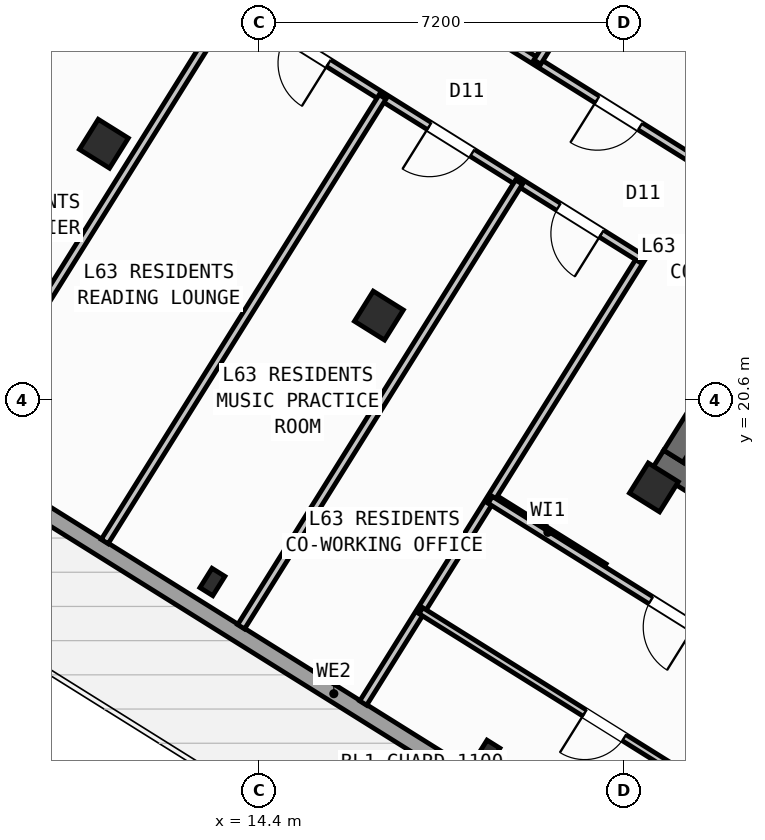
"""IFC4 building model, lengths in metres.
Left out: names, types, materials, properties, quantities, classifications, styles, units other than length and angle.
Written with IfcOpenShell. Run it as: python <this file> out.ifc"""

import sys

from ifc_helpers import new_model, si_unit, direction, frame, frame_2d, origin, origin_2d, place, context, subcontext, project, spatial, rectangle, hollow_rectangle, i_section, extrude, source, transform, mapped, element, fill, save


model = new_model("IFC4")
c1 = context("Model", 3, precision=1e-05, world=origin(), true_north=direction((0.0, 1.0)))
c2 = subcontext(c1, "Body", "Model", "MODEL_VIEW")
j1 = project(units=[si_unit("LENGTHUNIT", "METRE"), si_unit("PLANEANGLEUNIT", "RADIAN")], contexts=[c1])
p1 = place(None, origin())
s1 = spatial("IfcSite", under=j1, at=p1, CompositionType="ELEMENT")
p2 = place(p1, origin())
s2 = spatial("IfcBuilding", under=s1, at=p2, CompositionType="ELEMENT")
p3 = place(p2, frame((0.0, 0.0, 251.1)))
s3 = spatial("IfcBuildingStorey", under=s2, at=p3, CompositionType="ELEMENT", Elevation=251.1)
p4 = place(p3, frame((33.324, 12.503, 0.0), z_axis=(0.0, 0.0, 1.0), x_axis=(-0.848043529849, 0.529926571782, 0.0)))
e1 = element("IfcWall", 1, at=p4, inside=s3, PredefinedType="SHEAR", context=c2, shape_type="SweptSolid", body=[
    extrude(rectangle(XDim=13.04, YDim=0.45, at=frame_2d((6.52, 0.0))), origin(), (0.0, 0.0, 1.0), 3.32),
])
p5 = place(p3, frame((26.007, 24.976, 0.0), z_axis=(0.0, 0.0, 1.0), x_axis=(-0.529931155655, -0.848040665456, 0.0)))
e2 = element("IfcWall", 2, at=p5, inside=s3, PredefinedType="SHEAR", context=c2, shape_type="SweptSolid", body=[
    extrude(rectangle(XDim=6.475, YDim=0.45, at=frame_2d((3.238, 0.0))), origin(), (0.0, 0.0, 1.0), 3.32),
])
m1 = source(origin(), c2, "Body", "SweptSolid", [
    extrude(hollow_rectangle(XDim=0.7, YDim=0.7, WallThickness=0.028, at=origin_2d()), origin(), (0.0, 0.0, 1.0), 3.6),
])
p6 = place(p3, frame((22.191, 18.87, 0.0), z_axis=(0.0, 0.0, 1.0), x_axis=(-0.848048096156, 0.529919264233, 0.0)))
e3 = element("IfcColumn", 3, at=p6, inside=s3, PredefinedType="COLUMN", context=c2, shape_type="MappedRepresentation", body=[
    mapped(m1, transform((0.0, 0.0, 0.0), scale=1.0)),
])
m2 = source(origin(), c2, "Body", "SweptSolid", [
    extrude(i_section(OverallWidth=0.3, OverallDepth=0.45, WebThickness=0.014, FlangeThickness=0.026, at=origin_2d()), origin(), (0.0, 0.0, 1.0), 3.6),
])
p7 = place(p3, frame((18.906, 13.612, 0.0), z_axis=(0.0, 0.0, 1.0), x_axis=(-0.848048096156, 0.529919264233, 0.0)))
e4 = element("IfcColumn", 4, at=p7, inside=s3, PredefinedType="COLUMN", context=c2, shape_type="MappedRepresentation", body=[
    mapped(m2, transform((0.0, 0.0, 0.0), scale=1.0)),
])
p8 = place(p3, frame((16.764, 22.261, 0.0), z_axis=(0.0, 0.0, 1.0), x_axis=(-0.848048096156, 0.529919264233, 0.0)))
e5 = element("IfcColumn", 5, at=p8, inside=s3, PredefinedType="COLUMN", context=c2, shape_type="MappedRepresentation", body=[
    mapped(m1, transform((0.0, 0.0, 0.0), scale=1.0)),
])
p9 = place(p3, frame((13.478, 17.003, 0.0), z_axis=(0.0, 0.0, 1.0), x_axis=(-0.848048096156, 0.529919264233, 0.0)))
e6 = element("IfcColumn", 6, at=p9, inside=s3, PredefinedType="COLUMN", context=c2, shape_type="MappedRepresentation", body=[
    mapped(m2, transform((0.0, 0.0, 0.0), scale=1.0)),
])
p10 = place(p3, frame((11.336, 25.653, 0.0), z_axis=(0.0, 0.0, 1.0), x_axis=(-0.848048096156, 0.529919264233, 0.0)))
e7 = element("IfcColumn", 7, at=p10, inside=s3, PredefinedType="COLUMN", context=c2, shape_type="MappedRepresentation", body=[
    mapped(m1, transform((0.0, 0.0, 0.0), scale=1.0)),
])
p11 = place(p3, frame((29.268, 6.429, 0.0), z_axis=(0.0, 0.0, 1.0), x_axis=(-0.848049971435, 0.529916263149, 0.0)))
e8 = element("IfcWall", 8, at=p11, inside=s3, PredefinedType="STANDARD", context=c2, shape_type="SweptSolid", body=[
    extrude(rectangle(XDim=31.588, YDim=0.32, at=frame_2d((15.794, 0.0))), origin(), (0.0, 0.0, 1.0), 3.32),
])
p12 = place(p11, frame((22.848, 0.0, 0.0)))
e9 = element("IfcOpeningElement", 9, at=p12, cuts=e8, PredefinedType="OPENING", context=c2, shape_type="SweptSolid", body=[
    extrude(rectangle(XDim=1.2, YDim=2.15, at=frame_2d((0.6, 1.075))), frame((0.0, 0.17, 0.0), z_axis=(0.0, -1.0, 0.0), x_axis=(1.0, 0.0, 0.0)), (0.0, 0.0, 1.0), 0.34),
])
p13 = place(p11, frame((3.178, 0.0, 0.9)))
e10 = element("IfcOpeningElement", 10, at=p13, cuts=e8, PredefinedType="OPENING", context=c2, shape_type="SweptSolid", body=[
    extrude(rectangle(XDim=1.65, YDim=1.45, at=frame_2d((0.825, 0.725))), frame((0.0, 0.17, 0.0), z_axis=(0.0, -1.0, 0.0), x_axis=(1.0, 0.0, 0.0)), (0.0, 0.0, 1.0), 0.34),
])
p14 = place(p11, frame((8.478, 0.0, 0.9)))
e11 = element("IfcOpeningElement", 11, at=p14, cuts=e8, PredefinedType="OPENING", context=c2, shape_type="SweptSolid", body=[
    extrude(rectangle(XDim=1.65, YDim=1.45, at=frame_2d((0.825, 0.725))), frame((0.0, 0.17, 0.0), z_axis=(0.0, -1.0, 0.0), x_axis=(1.0, 0.0, 0.0)), (0.0, 0.0, 1.0), 0.34),
])
p15 = place(p3, frame((2.415, 23.452, 0.0), z_axis=(0.0, 0.0, 1.0), x_axis=(0.52991049553, 0.848053575387, 0.0)))
e12 = element("IfcWall", 12, at=p15, inside=s3, PredefinedType="STANDARD", context=c2, shape_type="SweptSolid", body=[
    extrude(rectangle(XDim=21.587, YDim=0.32, at=frame_2d((10.794, 0.0))), origin(), (0.0, 0.0, 1.0), 2.845),
])
p16 = place(p15, frame((3.119, 0.0, 0.9)))
e13 = element("IfcOpeningElement", 13, at=p16, cuts=e12, PredefinedType="OPENING", context=c2, shape_type="SweptSolid", body=[
    extrude(rectangle(XDim=1.65, YDim=1.45, at=frame_2d((0.825, 0.725))), frame((0.0, 0.17, 0.0), z_axis=(0.0, -1.0, 0.0), x_axis=(1.0, 0.0, 0.0)), (0.0, 0.0, 1.0), 0.34),
])
p17 = place(p15, frame((7.854, 0.0, 0.9)))
e14 = element("IfcOpeningElement", 14, at=p17, cuts=e12, PredefinedType="OPENING", context=c2, shape_type="SweptSolid", body=[
    extrude(rectangle(XDim=1.35, YDim=1.45, at=frame_2d((0.675, 0.725))), frame((0.0, 0.17, 0.0), z_axis=(0.0, -1.0, 0.0), x_axis=(1.0, 0.0, 0.0)), (0.0, 0.0, 1.0), 0.34),
])
p18 = place(p15, frame((16.979, 0.0, 0.95)))
e15 = element("IfcOpeningElement", 15, at=p18, cuts=e12, PredefinedType="OPENING", context=c2, shape_type="SweptSolid", body=[
    extrude(rectangle(XDim=1.95, YDim=1.35, at=frame_2d((0.975, 0.675))), frame((0.0, 0.17, 0.0), z_axis=(0.0, -1.0, 0.0), x_axis=(1.0, 0.0, 0.0)), (0.0, 0.0, 1.0), 0.34),
])
p19 = place(p3, frame((14.138, 41.825, 0.0), z_axis=(0.0, 0.0, 1.0), x_axis=(0.848046498049, -0.529921821731, 0.0)))
e16 = element("IfcWall", 16, at=p19, inside=s3, PredefinedType="STANDARD", context=c2, shape_type="SweptSolid", body=[
    extrude(rectangle(XDim=31.588, YDim=0.32, at=frame_2d((15.794, 0.0))), origin(), (0.0, 0.0, 1.0), 3.32),
])
p20 = place(p19, frame((3.46, 0.0, 0.0)))
e17 = element("IfcOpeningElement", 17, at=p20, cuts=e16, PredefinedType="OPENING", context=c2, shape_type="SweptSolid", body=[
    extrude(rectangle(XDim=1.05, YDim=2.15, at=frame_2d((0.525, 1.075))), frame((0.0, 0.17, 0.0), z_axis=(0.0, -1.0, 0.0), x_axis=(1.0, 0.0, 0.0)), (0.0, 0.0, 1.0), 0.34),
])
p21 = place(p19, frame((0.831, 0.0, 1.0)))
e18 = element("IfcOpeningElement", 18, at=p21, cuts=e16, PredefinedType="OPENING", context=c2, shape_type="SweptSolid", body=[
    extrude(rectangle(XDim=0.9, YDim=1.25, at=frame_2d((0.45, 0.625))), frame((0.0, 0.17, 0.0), z_axis=(0.0, -1.0, 0.0), x_axis=(1.0, 0.0, 0.0)), (0.0, 0.0, 1.0), 0.34),
])
p22 = place(p19, frame((9.837, 0.0, 0.9)))
e19 = element("IfcOpeningElement", 19, at=p22, cuts=e16, PredefinedType="OPENING", context=c2, shape_type="SweptSolid", body=[
    extrude(rectangle(XDim=1.35, YDim=1.45, at=frame_2d((0.675, 0.725))), frame((0.0, 0.17, 0.0), z_axis=(0.0, -1.0, 0.0), x_axis=(1.0, 0.0, 0.0)), (0.0, 0.0, 1.0), 0.34),
])
p23 = place(p19, frame((13.599, 0.0, 0.95)))
e20 = element("IfcOpeningElement", 20, at=p23, cuts=e16, PredefinedType="OPENING", context=c2, shape_type="SweptSolid", body=[
    extrude(rectangle(XDim=1.95, YDim=1.35, at=frame_2d((0.975, 0.675))), frame((0.0, 0.17, 0.0), z_axis=(0.0, -1.0, 0.0), x_axis=(1.0, 0.0, 0.0)), (0.0, 0.0, 1.0), 0.34),
])
p24 = place(p19, frame((17.154, 0.0, 1.0)))
e21 = element("IfcOpeningElement", 21, at=p24, cuts=e16, PredefinedType="OPENING", context=c2, shape_type="SweptSolid", body=[
    extrude(rectangle(XDim=0.9, YDim=1.25, at=frame_2d((0.45, 0.625))), frame((0.0, 0.17, 0.0), z_axis=(0.0, -1.0, 0.0), x_axis=(1.0, 0.0, 0.0)), (0.0, 0.0, 1.0), 0.34),
])
p25 = place(p19, frame((21.651, 0.0, 0.9)))
e22 = element("IfcOpeningElement", 22, at=p25, cuts=e16, PredefinedType="OPENING", context=c2, shape_type="SweptSolid", body=[
    extrude(rectangle(XDim=1.65, YDim=1.45, at=frame_2d((0.825, 0.725))), frame((0.0, 0.17, 0.0), z_axis=(0.0, -1.0, 0.0), x_axis=(1.0, 0.0, 0.0)), (0.0, 0.0, 1.0), 0.34),
])
p26 = place(p19, frame((27.215, 0.0, 0.9)))
e23 = element("IfcOpeningElement", 23, at=p26, cuts=e16, PredefinedType="OPENING", context=c2, shape_type="SweptSolid", body=[
    extrude(rectangle(XDim=1.65, YDim=1.45, at=frame_2d((0.825, 0.725))), frame((0.0, 0.17, 0.0), z_axis=(0.0, -1.0, 0.0), x_axis=(1.0, 0.0, 0.0)), (0.0, 0.0, 1.0), 0.34),
])
p27 = place(p3, frame((21.206, 17.292, 0.0), z_axis=(0.0, 0.0, 1.0), x_axis=(-0.848050851465, 0.529914854792, 0.0)))
e24 = element("IfcWall", 24, at=p27, inside=s3, PredefinedType="PARTITIONING", context=c2, shape_type="SweptSolid", body=[
    extrude(rectangle(XDim=2.61, YDim=0.16, at=frame_2d((1.305, 0.0))), origin(), (0.0, 0.0, 1.0), 3.31),
])
p28 = place(p3, frame((21.938, 23.391, 0.0), z_axis=(0.0, 0.0, 1.0), x_axis=(-0.529924725692, -0.848044683434, 0.0)))
e25 = element("IfcWall", 25, at=p28, inside=s3, PredefinedType="PARTITIONING", context=c2, shape_type="SweptSolid", body=[
    extrude(rectangle(XDim=10.35, YDim=0.16, at=frame_2d((5.175, 0.0))), origin(), (0.0, 0.0, 1.0), 3.31),
])
p29 = place(p3, frame((23.104, 25.256, 0.0), z_axis=(0.0, 0.0, 1.0), x_axis=(-0.848041752158, 0.529929416617, 0.0)))
e26 = element("IfcWall", 26, at=p29, inside=s3, PredefinedType="PARTITIONING", context=c2, shape_type="SweptSolid", body=[
    extrude(rectangle(XDim=16.73, YDim=0.16, at=frame_2d((8.365, 0.0))), origin(), (0.0, 0.0, 1.0), 3.31),
])
p30 = place(p29, frame((1.395, 0.0, 0.0)))
e27 = element("IfcOpeningElement", 27, at=p30, cuts=e26, PredefinedType="OPENING", context=c2, shape_type="SweptSolid", body=[
    extrude(rectangle(XDim=1.0, YDim=2.1, at=frame_2d((0.5, 1.05))), frame((0.0, 0.09, 0.0), z_axis=(0.0, -1.0, 0.0), x_axis=(1.0, 0.0, 0.0)), (0.0, 0.0, 1.0), 0.18),
])
p31 = place(p29, frame((7.82, 0.0, 0.0)))
e28 = element("IfcOpeningElement", 28, at=p31, cuts=e26, PredefinedType="OPENING", context=c2, shape_type="SweptSolid", body=[
    extrude(rectangle(XDim=1.0, YDim=2.1, at=frame_2d((0.5, 1.05))), frame((0.0, 0.09, 0.0), z_axis=(0.0, -1.0, 0.0), x_axis=(1.0, 0.0, 0.0)), (0.0, 0.0, 1.0), 0.18),
])
p32 = place(p29, frame((14.76, 0.0, 0.0)))
e29 = element("IfcOpeningElement", 29, at=p32, cuts=e26, PredefinedType="OPENING", context=c2, shape_type="SweptSolid", body=[
    extrude(rectangle(XDim=1.0, YDim=2.1, at=frame_2d((0.5, 1.05))), frame((0.0, 0.09, 0.0), z_axis=(0.0, -1.0, 0.0), x_axis=(1.0, 0.0, 0.0)), (0.0, 0.0, 1.0), 0.18),
])
p33 = place(p3, frame((21.938, 23.391, 0.0), z_axis=(0.0, 0.0, 1.0), x_axis=(-0.848045850158, 0.529922858565, 0.0)))
e30 = element("IfcWall", 30, at=p33, inside=s3, PredefinedType="PARTITIONING", context=c2, shape_type="SweptSolid", body=[
    extrude(rectangle(XDim=16.73, YDim=0.16, at=frame_2d((8.365, 0.0))), origin(), (0.0, 0.0, 1.0), 3.31),
])
p34 = place(p33, frame((0.92, 0.0, 0.0)))
e31 = element("IfcOpeningElement", 31, at=p34, cuts=e30, PredefinedType="OPENING", context=c2, shape_type="SweptSolid", body=[
    extrude(rectangle(XDim=1.0, YDim=2.1, at=frame_2d((0.5, 1.05))), frame((0.0, 0.09, 0.0), z_axis=(0.0, -1.0, 0.0), x_axis=(1.0, 0.0, 0.0)), (0.0, 0.0, 1.0), 0.18),
])
p35 = place(p33, frame((3.928, 0.0, 0.0)))
e32 = element("IfcOpeningElement", 32, at=p35, cuts=e30, PredefinedType="OPENING", context=c2, shape_type="SweptSolid", body=[
    extrude(rectangle(XDim=1.0, YDim=2.1, at=frame_2d((0.5, 1.05))), frame((0.0, 0.09, 0.0), z_axis=(0.0, -1.0, 0.0), x_axis=(1.0, 0.0, 0.0)), (0.0, 0.0, 1.0), 0.18),
])
p36 = place(p33, frame((7.271, 0.0, 0.0)))
e33 = element("IfcOpeningElement", 33, at=p36, cuts=e30, PredefinedType="OPENING", context=c2, shape_type="SweptSolid", body=[
    extrude(rectangle(XDim=1.0, YDim=2.1, at=frame_2d((0.5, 1.05))), frame((0.0, 0.09, 0.0), z_axis=(0.0, -1.0, 0.0), x_axis=(1.0, 0.0, 0.0)), (0.0, 0.0, 1.0), 0.18),
])
p37 = place(p33, frame((10.78, 0.0, 0.0)))
e34 = element("IfcOpeningElement", 34, at=p37, cuts=e30, PredefinedType="OPENING", context=c2, shape_type="SweptSolid", body=[
    extrude(rectangle(XDim=1.0, YDim=2.1, at=frame_2d((0.5, 1.05))), frame((0.0, 0.09, 0.0), z_axis=(0.0, -1.0, 0.0), x_axis=(1.0, 0.0, 0.0)), (0.0, 0.0, 1.0), 0.18),
])
p38 = place(p33, frame((14.372, 0.0, 0.0)))
e35 = element("IfcOpeningElement", 35, at=p38, cuts=e30, PredefinedType="OPENING", context=c2, shape_type="SweptSolid", body=[
    extrude(rectangle(XDim=1.0, YDim=2.1, at=frame_2d((0.5, 1.05))), frame((0.0, 0.09, 0.0), z_axis=(0.0, -1.0, 0.0), x_axis=(1.0, 0.0, 0.0)), (0.0, 0.0, 1.0), 0.18),
])
p39 = place(p3, frame((19.529, 24.896, 0.0), z_axis=(0.0, 0.0, 1.0), x_axis=(-0.529914125013, -0.848051307476, 0.0)))
e36 = element("IfcWall", 36, at=p39, inside=s3, PredefinedType="PARTITIONING", context=c2, shape_type="SweptSolid", body=[
    extrude(rectangle(XDim=10.35, YDim=0.16, at=frame_2d((5.175, 0.0))), origin(), (0.0, 0.0, 1.0), 3.31),
])
p40 = place(p3, frame((16.837, 26.579, 0.0), z_axis=(0.0, 0.0, 1.0), x_axis=(-0.529941690036, -0.848034082547, 0.0)))
e37 = element("IfcWall", 37, at=p40, inside=s3, PredefinedType="PARTITIONING", context=c2, shape_type="SweptSolid", body=[
    extrude(rectangle(XDim=10.35, YDim=0.16, at=frame_2d((5.175, 0.0))), origin(), (0.0, 0.0, 1.0), 2.935),
])
p41 = place(p3, frame((13.861, 28.438, 0.0), z_axis=(0.0, 0.0, 1.0), x_axis=(-0.529931089283, -0.848040706931, 0.0)))
e38 = element("IfcWall", 38, at=p41, inside=s3, PredefinedType="PARTITIONING", context=c2, shape_type="SweptSolid", body=[
    extrude(rectangle(XDim=10.35, YDim=0.16, at=frame_2d((5.175, 0.0))), origin(), (0.0, 0.0, 1.0), 3.31),
])
p42 = place(p3, frame((10.885, 30.298, 0.0), z_axis=(0.0, 0.0, 1.0), x_axis=(-0.529924725692, -0.848044683434, 0.0)))
e39 = element("IfcWall", 39, at=p42, inside=s3, PredefinedType="PARTITIONING", context=c2, shape_type="SweptSolid", body=[
    extrude(rectangle(XDim=10.35, YDim=0.16, at=frame_2d((5.175, 0.0))), origin(), (0.0, 0.0, 1.0), 3.31),
])
p43 = place(p3, frame((20.44, 28.145, 0.0), z_axis=(0.0, 0.0, 1.0), x_axis=(-0.529977795385, -0.848011519025, 0.0)))
e40 = element("IfcWall", 40, at=p43, inside=s3, PredefinedType="PARTITIONING", context=c2, shape_type="SweptSolid", body=[
    extrude(rectangle(XDim=1.038, YDim=0.16, at=frame_2d((0.519, 0.0))), origin(), (0.0, 0.0, 1.0), 2.845),
])
p44 = place(p3, frame((32.164, 10.374, 0.0), z_axis=(0.0, 0.0, 1.0), x_axis=(-0.848044107957, 0.529925646633, 0.0)))
e41 = element("IfcWall", 41, at=p44, inside=s3, PredefinedType="PARTITIONING", context=c2, shape_type="SweptSolid", body=[
    extrude(rectangle(XDim=15.57, YDim=0.16, at=frame_2d((7.785, 0.0))), origin(), (0.0, 0.0, 1.0), 3.31),
])
p45 = place(p44, frame((10.83, 0.0, 0.0)))
e42 = element("IfcOpeningElement", 42, at=p45, cuts=e41, PredefinedType="OPENING", context=c2, shape_type="SweptSolid", body=[
    extrude(rectangle(XDim=1.0, YDim=2.1, at=frame_2d((0.5, 1.05))), frame((0.0, 0.09, 0.0), z_axis=(0.0, -1.0, 0.0), x_axis=(1.0, 0.0, 0.0)), (0.0, 0.0, 1.0), 0.18),
])
p46 = place(p3, frame((29.72, 8.859, 0.0), z_axis=(0.0, 0.0, 1.0), x_axis=(-0.848049134363, 0.529917602752, 0.0)))
e43 = element("IfcWall", 43, at=p46, inside=s3, PredefinedType="PLUMBINGWALL", context=c2, shape_type="SweptSolid", body=[
    extrude(rectangle(XDim=14.3, YDim=0.14, at=frame_2d((7.15, 0.0))), origin(), (0.0, 0.0, 1.0), 3.31),
])
p47 = place(p46, frame((9.57, 0.0, 0.0)))
e44 = element("IfcOpeningElement", 44, at=p47, cuts=e43, PredefinedType="OPENING", context=c2, shape_type="SweptSolid", body=[
    extrude(rectangle(XDim=0.92, YDim=2.08, at=frame_2d((0.46, 1.04))), frame((0.0, 0.08, 0.0), z_axis=(0.0, -1.0, 0.0), x_axis=(1.0, 0.0, 0.0)), (0.0, 0.0, 1.0), 0.16),
])
m3 = source(origin(), c2, "Body", "SweptSolid", [
    extrude(rectangle(XDim=1.0, YDim=2.1, at=frame_2d((0.5, 1.05))), frame((0.0, 0.025, 0.0), z_axis=(0.0, -1.0, 0.0), x_axis=(1.0, 0.0, 0.0)), (0.0, 0.0, 1.0), 0.05),
])
p48 = place(p34, origin())
e45 = element("IfcDoor", 45, at=p48, inside=s3, OperationType="SINGLE_SWING_LEFT", PredefinedType="DOOR", context=c2, shape_type="MappedRepresentation", body=[
    mapped(m3, transform((0.0, 0.0, 0.0), scale=1.0)),
])
fill(e31, e45)
p49 = place(p35, origin())
e46 = element("IfcDoor", 46, at=p49, inside=s3, OperationType="SINGLE_SWING_RIGHT", PredefinedType="DOOR", context=c2, shape_type="MappedRepresentation", body=[
    mapped(m3, transform((0.0, 0.0, 0.0), scale=1.0)),
])
fill(e32, e46)
p50 = place(p36, origin())
e47 = element("IfcDoor", 47, at=p50, inside=s3, OperationType="SINGLE_SWING_LEFT", PredefinedType="DOOR", context=c2, shape_type="MappedRepresentation", body=[
    mapped(m3, transform((0.0, 0.0, 0.0), scale=1.0)),
])
fill(e33, e47)
p51 = place(p30, origin())
e48 = element("IfcDoor", 48, at=p51, inside=s3, OperationType="SINGLE_SWING_RIGHT", PredefinedType="DOOR", context=c2, shape_type="MappedRepresentation", body=[
    mapped(m3, transform((0.0, 0.0, 0.0), scale=1.0)),
])
fill(e27, e48)
p52 = place(p45, origin())
e49 = element("IfcDoor", 49, at=p52, inside=s3, OperationType="SINGLE_SWING_LEFT", PredefinedType="DOOR", context=c2, shape_type="MappedRepresentation", body=[
    mapped(m3, transform((0.0, 0.0, 0.0), scale=1.0)),
])
fill(e42, e49)
m4 = source(origin(), c2, "Body", "SweptSolid", [
    extrude(rectangle(XDim=0.92, YDim=2.08, at=frame_2d((0.46, 1.04))), frame((0.0, 0.025, 0.0), z_axis=(0.0, -1.0, 0.0), x_axis=(1.0, 0.0, 0.0)), (0.0, 0.0, 1.0), 0.05),
])
p53 = place(p47, origin())
e50 = element("IfcDoor", 50, at=p53, inside=s3, OperationType="SINGLE_SWING_RIGHT", PredefinedType="DOOR", context=c2, shape_type="MappedRepresentation", body=[
    mapped(m4, transform((0.0, 0.0, 0.0), scale=1.0)),
])
fill(e44, e50)
save(model, sys.argv[1])
